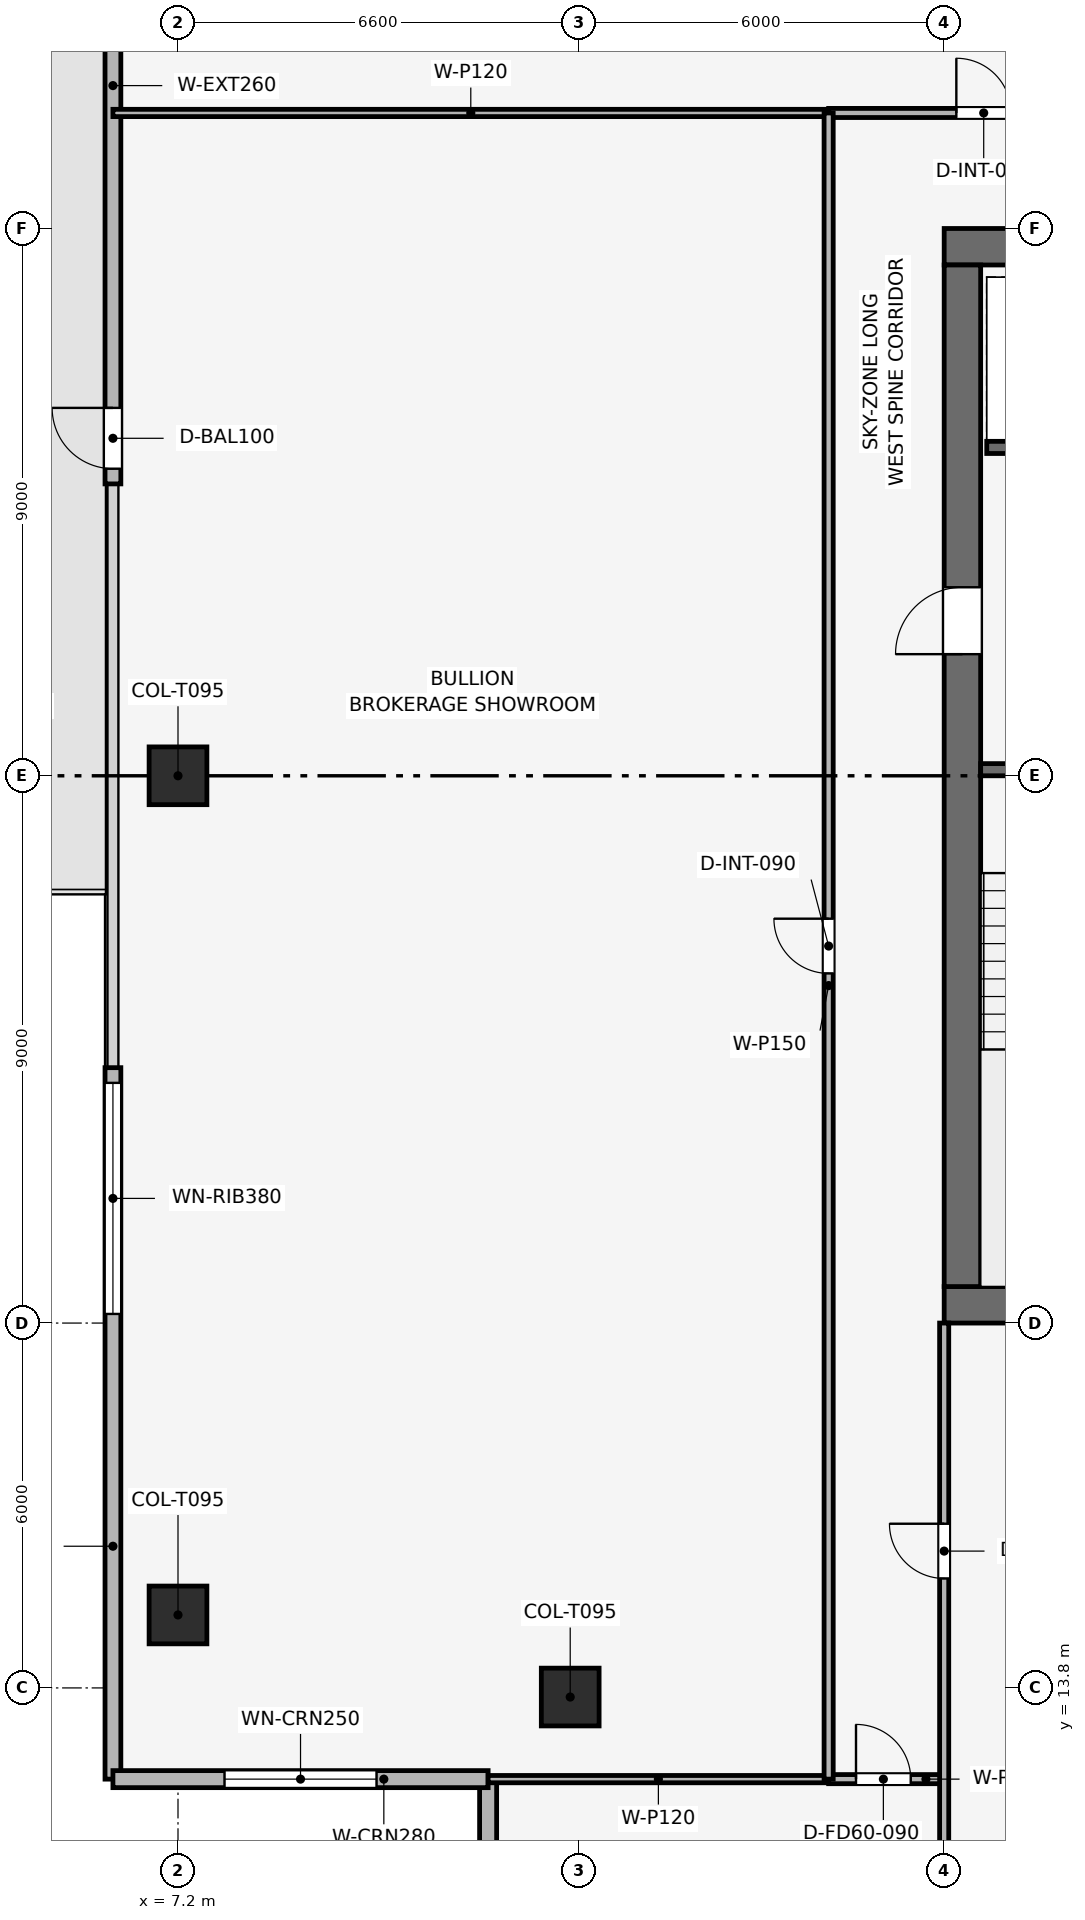
"""IFC4 building model, lengths in metres.
Left out: names, types, materials, properties, quantities, classifications, styles, units other than length and angle.
Written with IfcOpenShell. Run it as: python <this file> out.ifc"""

import sys

from ifc_helpers import new_model, si_unit, direction, frame, frame_2d, origin, origin_2d, place, context, subcontext, project, spatial, rectangle, extrude, element, fill, save


model = new_model("IFC4")
c1 = context("Model", 3, precision=1e-05, world=origin(), true_north=direction((0.0, 1.0)))
c2 = subcontext(c1, "Body", "Model", "MODEL_VIEW")
j1 = project(units=[si_unit("LENGTHUNIT", "METRE"), si_unit("PLANEANGLEUNIT", "RADIAN")], contexts=[c1])
p1 = place(None, origin())
s1 = spatial("IfcSite", under=j1, at=p1, CompositionType="ELEMENT")
p2 = place(p1, origin())
s2 = spatial("IfcBuilding", under=s1, at=p2, CompositionType="ELEMENT")
p3 = place(p2, frame((0.0, 0.0, 303.0)))
s3 = spatial("IfcBuildingStorey", under=s2, at=p3, CompositionType="ELEMENT", Elevation=303.0)
p4 = place(p3, frame((19.8, 20.1, 0.0), z_axis=(0.0, 0.0, 1.0), x_axis=(1.0, 0.0, 0.0)))
e1 = element("IfcWall", 1, at=p4, inside=s3, PredefinedType="SHEAR", context=c2, shape_type="SweptSolid", body=[
    extrude(rectangle(XDim=18.0, YDim=0.6, at=frame_2d((9.0, 0.0))), origin(), (0.0, 0.0, 1.0), 3.75),
])
p5 = place(p3, frame((19.8, 37.5, 0.0), z_axis=(0.0, 0.0, 1.0), x_axis=(1.0, 0.0, 0.0)))
e2 = element("IfcWall", 2, at=p5, inside=s3, PredefinedType="SHEAR", context=c2, shape_type="SweptSolid", body=[
    extrude(rectangle(XDim=18.0, YDim=0.6, at=frame_2d((9.0, 0.0))), origin(), (0.0, 0.0, 1.0), 3.75),
])
p6 = place(p5, frame((7.05, 0.0, 0.0)))
e3 = element("IfcOpeningElement", 3, at=p6, cuts=e2, PredefinedType="OPENING", context=c2, shape_type="SweptSolid", body=[
    extrude(rectangle(XDim=1.1, YDim=2.15, at=frame_2d((0.55, 1.075))), frame((0.0, 0.31, 0.0), z_axis=(0.0, -1.0, 0.0), x_axis=(1.0, 0.0, 0.0)), (0.0, 0.0, 1.0), 0.62),
])
p7 = place(p3, frame((20.1, 20.4, 0.0), z_axis=(0.0, 0.0, 1.0), x_axis=(0.0, 1.0, 0.0)))
e4 = element("IfcWall", 4, at=p7, inside=s3, PredefinedType="SHEAR", context=c2, shape_type="SweptSolid", body=[
    extrude(rectangle(XDim=16.8, YDim=0.6, at=frame_2d((8.4, 0.0))), origin(), (0.0, 0.0, 1.0), 3.75),
])
p8 = place(p7, frame((10.4, 0.0, 0.0)))
e5 = element("IfcOpeningElement", 5, at=p8, cuts=e4, PredefinedType="OPENING", context=c2, shape_type="SweptSolid", body=[
    extrude(rectangle(XDim=1.1, YDim=2.15, at=frame_2d((0.55, 1.075))), frame((0.0, 0.31, 0.0), z_axis=(0.0, -1.0, 0.0), x_axis=(1.0, 0.0, 0.0)), (0.0, 0.0, 1.0), 0.62),
])
for number, where, z_axis, x_axis in (
    (6, (7.2, 28.8, 0.003), (0.0, 0.0, 1.0), (1.0, 0.0, 0.0)),
    (7, (7.2, 15.0, 0.003), (0.0, 0.0, 1.0), (1.0, 0.0, 0.0)),
    (8, (13.65, 13.65, 0.003), (0.0, 0.0, 1.0), (1.0, 0.0, 0.0)),
):
    element("IfcColumn", number, at=place(p3, frame(where, z_axis=z_axis, x_axis=x_axis)), inside=s3, PredefinedType="COLUMN", context=c2, shape_type="SweptSolid", body=[
        extrude(rectangle(XDim=0.95, YDim=0.95, at=origin_2d()), origin(), (0.0, 0.0, 1.0), 3.504),
    ])
p9 = place(p3, frame((6.13, 12.3, 0.0), z_axis=(0.0, 0.0, 1.0), x_axis=(0.0, 1.0, 0.0)))
e9 = element("IfcWall", 9, at=p9, inside=s3, PredefinedType="SOLIDWALL", context=c2, shape_type="SweptSolid", body=[
    extrude(rectangle(XDim=11.7, YDim=0.26, at=frame_2d((5.85, 0.0))), origin(), (0.0, 0.0, 1.0), 3.51),
])
p10 = place(p9, frame((7.65, 0.0, 0.9)))
e10 = element("IfcOpeningElement", 10, at=p10, cuts=e9, PredefinedType="OPENING", context=c2, shape_type="SweptSolid", body=[
    extrude(rectangle(XDim=3.8, YDim=1.9, at=frame_2d((1.9, 0.95))), frame((0.0, 0.14, 0.0), z_axis=(0.0, -1.0, 0.0), x_axis=(1.0, 0.0, 0.0)), (0.0, 0.0, 1.0), 0.28),
])
p11 = place(p3, frame((6.13, 33.6, 0.0), z_axis=(0.0, 0.0, 1.0), x_axis=(0.0, 1.0, 0.0)))
e11 = element("IfcWall", 11, at=p11, inside=s3, PredefinedType="SOLIDWALL", context=c2, shape_type="SweptSolid", body=[
    extrude(rectangle(XDim=11.7, YDim=0.26, at=frame_2d((5.85, 0.0))), origin(), (0.0, 0.0, 1.0), 3.51),
])
p12 = place(p11, frame((0.25, 0.0, 0.0)))
e12 = element("IfcOpeningElement", 12, at=p12, cuts=e11, PredefinedType="OPENING", context=c2, shape_type="SweptSolid", body=[
    extrude(rectangle(XDim=1.0, YDim=2.2, at=frame_2d((0.5, 1.1))), frame((0.0, 0.14, 0.0), z_axis=(0.0, -1.0, 0.0), x_axis=(1.0, 0.0, 0.0)), (0.0, 0.0, 1.0), 0.28),
])
p13 = place(p3, frame((12.3, 6.13, 0.0), z_axis=(0.0, 0.0, 1.0), x_axis=(0.0, 1.0, 0.0)))
e13 = element("IfcWall", 13, at=p13, inside=s3, PredefinedType="SOLIDWALL", context=c2, shape_type="SweptSolid", body=[
    extrude(rectangle(XDim=6.17, YDim=0.28, at=frame_2d((3.085, 0.0))), origin(), (0.0, 0.0, 1.0), 3.51),
])
p14 = place(p13, frame((1.835, 0.0, 0.9)))
e14 = element("IfcOpeningElement", 14, at=p14, cuts=e13, PredefinedType="OPENING", context=c2, shape_type="SweptSolid", body=[
    extrude(rectangle(XDim=2.5, YDim=1.9, at=frame_2d((1.25, 0.95))), frame((0.0, 0.15, 0.0), z_axis=(0.0, -1.0, 0.0), x_axis=(1.0, 0.0, 0.0)), (0.0, 0.0, 1.0), 0.3),
])
p15 = place(p3, frame((12.3, 12.3, 0.0), z_axis=(0.0, 0.0, 1.0), x_axis=(-1.0, 0.0, 0.0)))
e15 = element("IfcWall", 15, at=p15, inside=s3, PredefinedType="SOLIDWALL", context=c2, shape_type="SweptSolid", body=[
    extrude(rectangle(XDim=6.17, YDim=0.28, at=frame_2d((3.085, 0.0))), origin(), (0.0, 0.0, 1.0), 3.51),
])
p16 = place(p15, frame((1.835, 0.0, 0.9)))
e16 = element("IfcOpeningElement", 16, at=p16, cuts=e15, PredefinedType="OPENING", context=c2, shape_type="SweptSolid", body=[
    extrude(rectangle(XDim=2.5, YDim=1.9, at=frame_2d((1.25, 0.95))), frame((0.0, 0.15, 0.0), z_axis=(0.0, -1.0, 0.0), x_axis=(1.0, 0.0, 0.0)), (0.0, 0.0, 1.0), 0.3),
])
p17 = place(p3, frame((20.4, 28.9, 0.0), z_axis=(0.0, 0.0, 1.0), x_axis=(1.0, 0.0, 0.0)))
e17 = element("IfcWall", 17, at=p17, inside=s3, PredefinedType="SHEAR", context=c2, shape_type="SweptSolid", body=[
    extrude(rectangle(XDim=3.15, YDim=0.2, at=frame_2d((1.575, 0.0))), origin(), (0.0, 0.0, 1.0), 3.51),
])
p18 = place(p17, frame((0.8, 0.0, 0.0)))
e18 = element("IfcOpeningElement", 18, at=p18, cuts=e17, PredefinedType="OPENING", context=c2, shape_type="SweptSolid", body=[
    extrude(rectangle(XDim=1.0, YDim=2.1, at=frame_2d((0.5, 1.05))), frame((0.0, 0.11, 0.0), z_axis=(0.0, -1.0, 0.0), x_axis=(1.0, 0.0, 0.0)), (0.0, 0.0, 1.0), 0.22),
])
p19 = place(p3, frame((20.5, 34.2, 0.0), z_axis=(0.0, 0.0, 1.0), x_axis=(1.0, 0.0, 0.0)))
e19 = element("IfcWall", 19, at=p19, inside=s3, PredefinedType="SHEAR", context=c2, shape_type="SweptSolid", body=[
    extrude(rectangle(XDim=3.05, YDim=0.2, at=frame_2d((1.525, 0.0))), origin(), (0.0, 0.0, 1.0), 3.51),
])
p20 = place(p19, frame((0.75, 0.0, 0.0)))
e20 = element("IfcOpeningElement", 20, at=p20, cuts=e19, PredefinedType="OPENING", context=c2, shape_type="SweptSolid", body=[
    extrude(rectangle(XDim=1.1, YDim=2.15, at=frame_2d((0.55, 1.075))), frame((0.0, 0.11, 0.0), z_axis=(0.0, -1.0, 0.0), x_axis=(1.0, 0.0, 0.0)), (0.0, 0.0, 1.0), 0.22),
])
p21 = place(p3, frame((12.3, 12.3, 0.0), z_axis=(0.0, 0.0, 1.0), x_axis=(1.0, 0.0, 0.0)))
e21 = element("IfcWall", 21, at=p21, inside=s3, PredefinedType="PARTITIONING", context=c2, shape_type="SweptSolid", body=[
    extrude(rectangle(XDim=5.6, YDim=0.12, at=frame_2d((2.8, 0.0))), origin(), (0.0, 0.0, 1.0), 3.195),
])
p22 = place(p3, frame((17.9, 12.3, 0.0), z_axis=(0.0, 0.0, 1.0), x_axis=(1.0, 0.0, 0.0)))
e22 = element("IfcWall", 22, at=p22, inside=s3, PredefinedType="PARTITIONING", context=c2, shape_type="SweptSolid", body=[
    extrude(rectangle(XDim=1.9, YDim=0.15, at=frame_2d((0.95, 0.0))), origin(), (0.0, 0.0, 1.0), 3.51),
])
p23 = place(p22, frame((0.45, 0.0, 0.0)))
e23 = element("IfcOpeningElement", 23, at=p23, cuts=e22, PredefinedType="OPENING", context=c2, shape_type="SweptSolid", body=[
    extrude(rectangle(XDim=0.9, YDim=2.1, at=frame_2d((0.45, 1.05))), frame((0.0, 0.085, 0.0), z_axis=(0.0, -1.0, 0.0), x_axis=(1.0, 0.0, 0.0)), (0.0, 0.0, 1.0), 0.17),
])
p24 = place(p3, frame((19.8, 6.13, 0.0), z_axis=(0.0, 0.0, 1.0), x_axis=(0.0, 1.0, 0.0)))
e24 = element("IfcWall", 24, at=p24, inside=s3, PredefinedType="PARTITIONING", context=c2, shape_type="SweptSolid", body=[
    extrude(rectangle(XDim=13.67, YDim=0.15, at=frame_2d((6.835, 0.0))), origin(), (0.0, 0.0, 1.0), 3.095),
])
p25 = place(p24, frame((9.47, 0.0, 0.0)))
e25 = element("IfcOpeningElement", 25, at=p25, cuts=e24, PredefinedType="OPENING", context=c2, shape_type="SweptSolid", body=[
    extrude(rectangle(XDim=0.9, YDim=2.1, at=frame_2d((0.45, 1.05))), frame((0.0, 0.085, 0.0), z_axis=(0.0, -1.0, 0.0), x_axis=(1.0, 0.0, 0.0)), (0.0, 0.0, 1.0), 0.17),
])
p26 = place(p3, frame((6.13, 39.7, 0.0), z_axis=(0.0, 0.0, 1.0), x_axis=(1.0, 0.0, 0.0)))
e26 = element("IfcWall", 26, at=p26, inside=s3, PredefinedType="PARTITIONING", context=c2, shape_type="SweptSolid", body=[
    extrude(rectangle(XDim=11.77, YDim=0.12, at=frame_2d((5.885, 0.0))), origin(), (0.0, 0.0, 1.0), 3.095),
])
p27 = place(p3, frame((17.9, 39.7, 0.0), z_axis=(0.0, 0.0, 1.0), x_axis=(1.0, 0.0, 0.0)))
e27 = element("IfcWall", 27, at=p27, inside=s3, PredefinedType="PARTITIONING", context=c2, shape_type="SweptSolid", body=[
    extrude(rectangle(XDim=21.8, YDim=0.15, at=frame_2d((10.9, 0.0))), origin(), (0.0, 0.0, 1.0), 3.095),
])
p28 = place(p27, frame((2.1, 0.0, 0.0)))
e28 = element("IfcOpeningElement", 28, at=p28, cuts=e27, PredefinedType="OPENING", context=c2, shape_type="SweptSolid", body=[
    extrude(rectangle(XDim=0.9, YDim=2.1, at=frame_2d((0.45, 1.05))), frame((0.0, 0.085, 0.0), z_axis=(0.0, -1.0, 0.0), x_axis=(1.0, 0.0, 0.0)), (0.0, 0.0, 1.0), 0.17),
])
p29 = place(p27, frame((6.05, 0.0, 0.0)))
e29 = element("IfcOpeningElement", 29, at=p29, cuts=e27, PredefinedType="OPENING", context=c2, shape_type="SweptSolid", body=[
    extrude(rectangle(XDim=0.9, YDim=2.1, at=frame_2d((0.45, 1.05))), frame((0.0, 0.085, 0.0), z_axis=(0.0, -1.0, 0.0), x_axis=(1.0, 0.0, 0.0)), (0.0, 0.0, 1.0), 0.17),
])
p30 = place(p27, frame((8.95, 0.0, 0.0)))
e30 = element("IfcOpeningElement", 30, at=p30, cuts=e27, PredefinedType="OPENING", context=c2, shape_type="SweptSolid", body=[
    extrude(rectangle(XDim=0.9, YDim=2.1, at=frame_2d((0.45, 1.05))), frame((0.0, 0.085, 0.0), z_axis=(0.0, -1.0, 0.0), x_axis=(1.0, 0.0, 0.0)), (0.0, 0.0, 1.0), 0.17),
])
p31 = place(p27, frame((11.7, 0.0, 0.0)))
e31 = element("IfcOpeningElement", 31, at=p31, cuts=e27, PredefinedType="OPENING", context=c2, shape_type="SweptSolid", body=[
    extrude(rectangle(XDim=0.95, YDim=2.1, at=frame_2d((0.475, 1.05))), frame((0.0, 0.085, 0.0), z_axis=(0.0, -1.0, 0.0), x_axis=(1.0, 0.0, 0.0)), (0.0, 0.0, 1.0), 0.17),
])
p32 = place(p27, frame((17.2, 0.0, 0.0)))
e32 = element("IfcOpeningElement", 32, at=p32, cuts=e27, PredefinedType="OPENING", context=c2, shape_type="SweptSolid", body=[
    extrude(rectangle(XDim=0.9, YDim=2.1, at=frame_2d((0.45, 1.05))), frame((0.0, 0.085, 0.0), z_axis=(0.0, -1.0, 0.0), x_axis=(1.0, 0.0, 0.0)), (0.0, 0.0, 1.0), 0.17),
])
p33 = place(p3, frame((17.9, 12.3, 0.0), z_axis=(0.0, 0.0, 1.0), x_axis=(0.0, 1.0, 0.0)))
e33 = element("IfcWall", 33, at=p33, inside=s3, PredefinedType="PARTITIONING", context=c2, shape_type="SweptSolid", body=[
    extrude(rectangle(XDim=27.4, YDim=0.15, at=frame_2d((13.7, 0.0))), origin(), (0.0, 0.0, 1.0), 3.095),
])
p34 = place(p33, frame((13.25, 0.0, 0.0)))
e34 = element("IfcOpeningElement", 34, at=p34, cuts=e33, PredefinedType="OPENING", context=c2, shape_type="SweptSolid", body=[
    extrude(rectangle(XDim=0.9, YDim=2.1, at=frame_2d((0.45, 1.05))), frame((0.0, 0.085, 0.0), z_axis=(0.0, -1.0, 0.0), x_axis=(1.0, 0.0, 0.0)), (0.0, 0.0, 1.0), 0.17),
])
p35 = place(p12, origin())
e35 = element("IfcDoor", 35, at=p35, inside=s3, OperationType="SINGLE_SWING_RIGHT", PredefinedType="DOOR", context=c2, shape_type="SweptSolid", body=[
    extrude(rectangle(XDim=1.0, YDim=2.2, at=frame_2d((0.5, 1.1))), frame((0.0, 0.025, 0.0), z_axis=(0.0, -1.0, 0.0), x_axis=(1.0, 0.0, 0.0)), (0.0, 0.0, 1.0), 0.05),
])
fill(e12, e35)
p36 = place(p10, origin())
e36 = element("IfcWindow", 36, at=p36, inside=s3, PartitioningType="SINGLE_PANEL", PredefinedType="WINDOW", context=c2, shape_type="SweptSolid", body=[
    extrude(rectangle(XDim=3.8, YDim=1.9, at=frame_2d((1.9, 0.95))), frame((0.0, 0.03, 0.0), z_axis=(0.0, -1.0, 0.0), x_axis=(1.0, 0.0, 0.0)), (0.0, 0.0, 1.0), 0.06),
])
fill(e10, e36)
p37 = place(p16, origin())
e37 = element("IfcWindow", 37, at=p37, inside=s3, PartitioningType="SINGLE_PANEL", PredefinedType="WINDOW", context=c2, shape_type="SweptSolid", body=[
    extrude(rectangle(XDim=2.5, YDim=1.9, at=frame_2d((1.25, 0.95))), frame((0.0, 0.03, 0.0), z_axis=(0.0, -1.0, 0.0), x_axis=(1.0, 0.0, 0.0)), (0.0, 0.0, 1.0), 0.06),
])
fill(e16, e37)
p38 = place(p23, origin())
e38 = element("IfcDoor", 38, at=p38, inside=s3, OperationType="SINGLE_SWING_LEFT", PredefinedType="DOOR", context=c2, shape_type="SweptSolid", body=[
    extrude(rectangle(XDim=0.9, YDim=2.1, at=frame_2d((0.45, 1.05))), frame((0.0, 0.025, 0.0), z_axis=(0.0, -1.0, 0.0), x_axis=(1.0, 0.0, 0.0)), (0.0, 0.0, 1.0), 0.05),
])
fill(e23, e38)
p39 = place(p25, origin())
e39 = element("IfcDoor", 39, at=p39, inside=s3, OperationType="SINGLE_SWING_RIGHT", PredefinedType="DOOR", context=c2, shape_type="SweptSolid", body=[
    extrude(rectangle(XDim=0.9, YDim=2.1, at=frame_2d((0.45, 1.05))), frame((0.0, 0.025, 0.0), z_axis=(0.0, -1.0, 0.0), x_axis=(1.0, 0.0, 0.0)), (0.0, 0.0, 1.0), 0.05),
])
fill(e25, e39)
p40 = place(p28, origin())
e40 = element("IfcDoor", 40, at=p40, inside=s3, OperationType="SINGLE_SWING_LEFT", PredefinedType="DOOR", context=c2, shape_type="SweptSolid", body=[
    extrude(rectangle(XDim=0.9, YDim=2.1, at=frame_2d((0.45, 1.05))), frame((0.0, 0.025, 0.0), z_axis=(0.0, -1.0, 0.0), x_axis=(1.0, 0.0, 0.0)), (0.0, 0.0, 1.0), 0.05),
])
fill(e28, e40)
p41 = place(p34, origin())
e41 = element("IfcDoor", 41, at=p41, inside=s3, OperationType="SINGLE_SWING_RIGHT", PredefinedType="DOOR", context=c2, shape_type="SweptSolid", body=[
    extrude(rectangle(XDim=0.9, YDim=2.1, at=frame_2d((0.45, 1.05))), frame((0.0, 0.025, 0.0), z_axis=(0.0, -1.0, 0.0), x_axis=(1.0, 0.0, 0.0)), (0.0, 0.0, 1.0), 0.05),
])
fill(e34, e41)
p42 = place(p8, origin())
e42 = element("IfcDoor", 42, at=p42, inside=s3, OperationType="SINGLE_SWING_LEFT", PredefinedType="DOOR", context=c2, shape_type="SweptSolid", body=[
    extrude(rectangle(XDim=1.1, YDim=2.15, at=frame_2d((0.55, 1.075))), frame((0.0, 0.025, 0.0), z_axis=(0.0, -1.0, 0.0), x_axis=(1.0, 0.0, 0.0)), (0.0, 0.0, 1.0), 0.05),
])
fill(e5, e42)
save(model, sys.argv[1])
